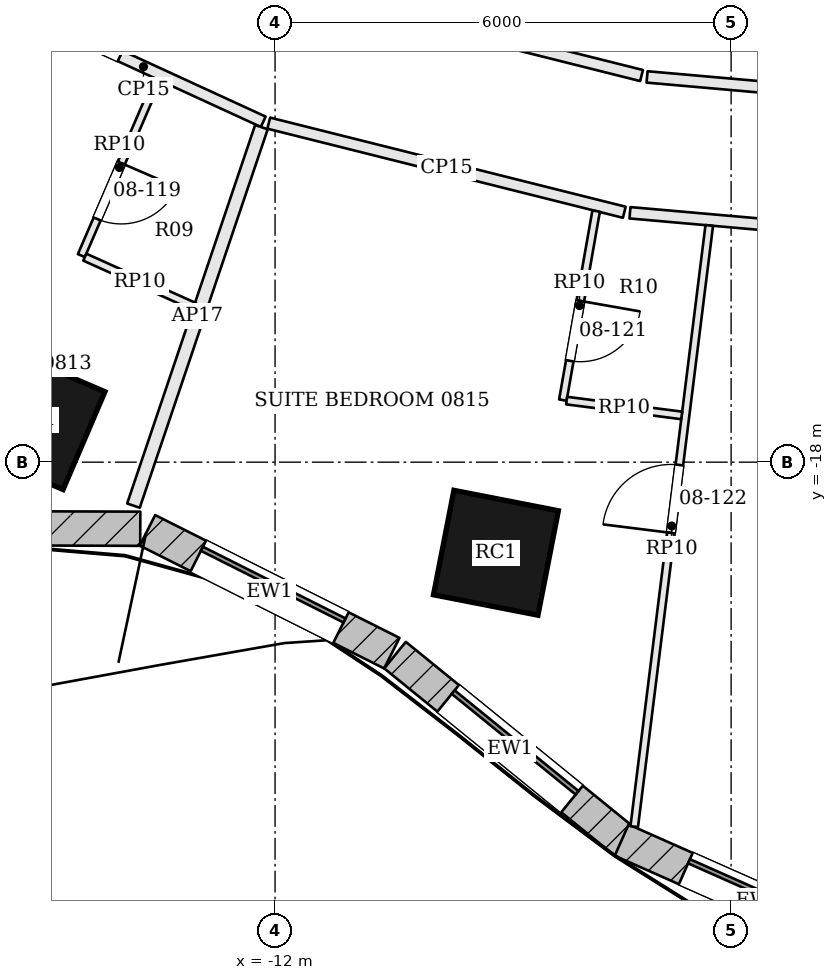
"""IFC4 building model, lengths in metres.
Left out: names, types, materials, properties, quantities, classifications, styles, units other than length and angle.
Written with IfcOpenShell. Run it as: python <this file> out.ifc"""

import sys

from ifc_helpers import new_model, si_unit, direction, frame, frame_2d, origin, origin_2d, place, context, subcontext, project, spatial, rectangle, extrude, element, fill, save


model = new_model("IFC4")
c1 = context("Model", 3, precision=1e-05, world=origin(), true_north=direction((0.0, 1.0)))
c2 = subcontext(c1, "Body", "Model", "MODEL_VIEW")
j1 = project(units=[si_unit("LENGTHUNIT", "METRE"), si_unit("PLANEANGLEUNIT", "RADIAN")], contexts=[c1])
p1 = place(None, origin())
s1 = spatial("IfcSite", under=j1, at=p1, CompositionType="ELEMENT")
p2 = place(p1, origin())
s2 = spatial("IfcBuilding", under=s1, at=p2, CompositionType="ELEMENT")
p3 = place(p2, frame((0.0, 0.0, 44.7)))
s3 = spatial("IfcBuildingStorey", under=s2, at=p3, CompositionType="ELEMENT", Elevation=44.7)
for number, where, z_axis, x_axis in (
    (1, (-15.157, -17.441, 0.0), (0.0, 0.0, 1.0), (0.919, -0.394, 0.0)),
    (2, (-9.094, -19.192, 0.0), (0.0, 0.0, 1.0), (0.981, -0.192, 0.0)),
):
    element("IfcColumn", number, at=place(p3, frame(where, z_axis=z_axis, x_axis=x_axis)), inside=s3, PredefinedType="COLUMN", context=c2, shape_type="SweptSolid", body=[
        extrude(rectangle(XDim=1.4, YDim=1.4, at=origin_2d()), origin(), (0.0, 0.0, 1.0), 3.6),
    ])
p4 = place(p3, frame((-19.65, -18.857, 0.0), z_axis=(0.0, 0.0, 1.0), x_axis=(0.999994750773, -0.003240127552, 0.0)))
e3 = element("IfcWall", 3, at=p4, inside=s3, PredefinedType="SOLIDWALL", context=c2, shape_type="SweptSolid", body=[
    extrude(rectangle(XDim=5.877, YDim=0.45, at=frame_2d((2.938, 0.0))), origin(), (0.0, 0.0, 1.0), 3.4),
])
p5 = place(p4, frame((1.889, 0.0, 0.9)))
e4 = element("IfcOpeningElement", 4, at=p5, cuts=e3, PredefinedType="OPENING", context=c2, shape_type="SweptSolid", body=[
    extrude(rectangle(XDim=2.1, YDim=2.0, at=frame_2d((1.05, 1.0))), frame((0.0, 0.235, 0.0), z_axis=(0.0, -1.0, 0.0), x_axis=(1.0, 0.0, 0.0)), (0.0, 0.0, 1.0), 0.47),
])
p6 = place(p3, frame((-13.679, -18.897, 0.0), z_axis=(0.0, 0.0, 1.0), x_axis=(0.893502471356, -0.449058274259, 0.0)))
e5 = element("IfcWall", 5, at=p6, inside=s3, PredefinedType="SOLIDWALL", context=c2, shape_type="SweptSolid", body=[
    extrude(rectangle(XDim=3.598, YDim=0.45, at=frame_2d((1.799, 0.0))), origin(), (0.0, 0.0, 1.0), 3.4),
])
p7 = place(p6, frame((0.749, 0.0, 0.9)))
e6 = element("IfcOpeningElement", 6, at=p7, cuts=e5, PredefinedType="OPENING", context=c2, shape_type="SweptSolid", body=[
    extrude(rectangle(XDim=2.1, YDim=2.0, at=frame_2d((1.05, 1.0))), frame((0.0, 0.235, 0.0), z_axis=(0.0, -1.0, 0.0), x_axis=(1.0, 0.0, 0.0)), (0.0, 0.0, 1.0), 0.47),
])
p8 = place(p3, frame((-10.422, -20.539, 0.0), z_axis=(0.0, 0.0, 1.0), x_axis=(0.775999170522, -0.63073392754, 0.0)))
e7 = element("IfcWall", 7, at=p8, inside=s3, PredefinedType="SOLIDWALL", context=c2, shape_type="SweptSolid", body=[
    extrude(rectangle(XDim=3.903, YDim=0.45, at=frame_2d((1.951, 0.0))), origin(), (0.0, 0.0, 1.0), 3.4),
])
p9 = place(p8, frame((0.901, 0.0, 0.9)))
e8 = element("IfcOpeningElement", 8, at=p9, cuts=e7, PredefinedType="OPENING", context=c2, shape_type="SweptSolid", body=[
    extrude(rectangle(XDim=2.1, YDim=2.0, at=frame_2d((1.05, 1.0))), frame((0.0, 0.235, 0.0), z_axis=(0.0, -1.0, 0.0), x_axis=(1.0, 0.0, 0.0)), (0.0, 0.0, 1.0), 0.47),
])
p10 = place(p3, frame((-7.44, -22.972, 0.0), z_axis=(0.0, 0.0, 1.0), x_axis=(0.914114918534, -0.405455195692, 0.0)))
e9 = element("IfcWall", 9, at=p10, inside=s3, PredefinedType="SOLIDWALL", context=c2, shape_type="SweptSolid", body=[
    extrude(rectangle(XDim=3.946, YDim=0.45, at=frame_2d((1.973, 0.0))), origin(), (0.0, 0.0, 1.0), 3.4),
])
p11 = place(p10, frame((0.923, 0.0, 0.9)))
e10 = element("IfcOpeningElement", 10, at=p11, cuts=e9, PredefinedType="OPENING", context=c2, shape_type="SweptSolid", body=[
    extrude(rectangle(XDim=2.1, YDim=2.0, at=frame_2d((1.05, 1.0))), frame((0.0, 0.235, 0.0), z_axis=(0.0, -1.0, 0.0), x_axis=(1.0, 0.0, 0.0)), (0.0, 0.0, 1.0), 0.47),
])
p12 = place(p3, frame((-15.306, -12.073, 0.0), z_axis=(0.0, 0.0, 1.0), x_axis=(0.908590925734, -0.417687119354, 0.0)))
e11 = element("IfcWall", 11, at=p12, inside=s3, PredefinedType="PARTITIONING", context=c2, shape_type="SweptSolid", body=[
    extrude(rectangle(XDim=3.468, YDim=0.15, at=frame_2d((1.734, 0.0))), origin(), (0.0, 0.0, 1.0), 2.68),
])
p13 = place(p12, frame((0.496, 0.0, 0.0)))
e12 = element("IfcOpeningElement", 12, at=p13, cuts=e11, PredefinedType="OPENING", context=c2, shape_type="SweptSolid", body=[
    extrude(rectangle(XDim=0.9, YDim=2.4, at=frame_2d((0.45, 1.2))), frame((0.0, 0.085, 0.0), z_axis=(0.0, -1.0, 0.0), x_axis=(1.0, 0.0, 0.0)), (0.0, 0.0, 1.0), 0.17),
])
p14 = place(p3, frame((-13.863, -18.572, 0.0), z_axis=(0.0, 0.0, 1.0), x_axis=(0.32028005449, 0.947322905189, 0.0)))
e13 = element("IfcWall", 13, at=p14, inside=s3, PredefinedType="PARTITIONING", context=c2, shape_type="SweptSolid", body=[
    extrude(rectangle(XDim=5.256, YDim=0.175, at=frame_2d((2.628, 0.0))), origin(), (0.0, 0.0, 1.0), 2.68),
])
p15 = place(p3, frame((-12.083, -13.54, 0.0), z_axis=(0.0, 0.0, 1.0), x_axis=(0.969981460173, -0.243178878443, 0.0)))
e14 = element("IfcWall", 14, at=p15, inside=s3, PredefinedType="PARTITIONING", context=c2, shape_type="SweptSolid", body=[
    extrude(rectangle(XDim=4.822, YDim=0.15, at=frame_2d((2.411, 0.0))), origin(), (0.0, 0.0, 1.0), 2.68),
])
p16 = place(p3, frame((-7.331, -14.719, 0.0), z_axis=(0.0, 0.0, 1.0), x_axis=(0.996139466017, -0.087784760882, 0.0)))
e15 = element("IfcWall", 15, at=p16, inside=s3, PredefinedType="PARTITIONING", context=c2, shape_type="SweptSolid", body=[
    extrude(rectangle(XDim=5.162, YDim=0.15, at=frame_2d((2.581, 0.0))), origin(), (0.0, 0.0, 1.0), 2.68),
])
p17 = place(p16, frame((3.622, 0.0, 0.0)))
e16 = element("IfcOpeningElement", 16, at=p17, cuts=e15, PredefinedType="OPENING", context=c2, shape_type="SweptSolid", body=[
    extrude(rectangle(XDim=1.0, YDim=2.1, at=frame_2d((0.5, 1.05))), frame((0.0, 0.085, 0.0), z_axis=(0.0, -1.0, 0.0), x_axis=(1.0, 0.0, 0.0)), (0.0, 0.0, 1.0), 0.17),
])
p18 = place(p3, frame((-2.208, -13.364, 0.0), z_axis=(0.0, 0.0, 1.0), x_axis=(-0.996134962793, 0.087835846335, 0.0)))
e17 = element("IfcWall", 17, at=p18, inside=s3, PredefinedType="PARTITIONING", context=c2, shape_type="SweptSolid", body=[
    extrude(rectangle(XDim=4.917, YDim=0.15, at=frame_2d((2.458, 0.0))), origin(), (0.0, 0.0, 1.0), 2.68),
])
p19 = place(p3, frame((-7.178, -12.914, 0.0), z_axis=(0.0, 0.0, 1.0), x_axis=(-0.969983523639, 0.243170647628, 0.0)))
e18 = element("IfcWall", 18, at=p19, inside=s3, PredefinedType="PARTITIONING", context=c2, shape_type="SweptSolid", body=[
    extrude(rectangle(XDim=4.794, YDim=0.15, at=frame_2d((2.397, 0.0))), origin(), (0.0, 0.0, 1.0), 2.68),
])
p20 = place(p3, frame((-13.548, -12.964, 0.0), z_axis=(0.0, 0.0, 1.0), x_axis=(-0.396147057277, -0.918187077349, 0.0)))
e19 = element("IfcWall", 19, at=p20, inside=s3, PredefinedType="PARTITIONING", context=c2, shape_type="SweptSolid", body=[
    extrude(rectangle(XDim=2.525, YDim=0.1, at=frame_2d((1.262, 0.0))), origin(), (0.0, 0.0, 1.0), 2.68),
])
p21 = place(p20, frame((1.2, 0.0, 0.0)))
e20 = element("IfcOpeningElement", 20, at=p21, cuts=e19, PredefinedType="OPENING", context=c2, shape_type="SweptSolid", body=[
    extrude(rectangle(XDim=0.8, YDim=2.1, at=frame_2d((0.4, 1.05))), frame((0.0, 0.06, 0.0), z_axis=(0.0, -1.0, 0.0), x_axis=(1.0, 0.0, 0.0)), (0.0, 0.0, 1.0), 0.12),
])
p22 = place(p3, frame((-14.503, -15.303, 0.0), z_axis=(0.0, 0.0, 1.0), x_axis=(0.911884052512, -0.410447895323, 0.0)))
e21 = element("IfcWall", 21, at=p22, inside=s3, PredefinedType="PARTITIONING", context=c2, shape_type="SweptSolid", body=[
    extrude(rectangle(XDim=1.586, YDim=0.1, at=frame_2d((0.793, 0.0))), origin(), (0.0, 0.0, 1.0), 2.68),
])
p23 = place(p3, frame((-7.275, -22.795, 0.0), z_axis=(0.0, 0.0, 1.0), x_axis=(0.123872623133, 0.992298127197, 0.0)))
e22 = element("IfcWall", 22, at=p23, inside=s3, PredefinedType="PARTITIONING", context=c2, shape_type="SweptSolid", body=[
    extrude(rectangle(XDim=7.97, YDim=0.1, at=frame_2d((3.985, 0.0))), origin(), (0.0, 0.0, 1.0), 2.68),
])
p24 = place(p23, frame((3.895, 0.0, 0.0)))
e23 = element("IfcOpeningElement", 23, at=p24, cuts=e22, PredefinedType="OPENING", context=c2, shape_type="SweptSolid", body=[
    extrude(rectangle(XDim=0.9, YDim=2.4, at=frame_2d((0.45, 1.2))), frame((0.0, 0.06, 0.0), z_axis=(0.0, -1.0, 0.0), x_axis=(1.0, 0.0, 0.0)), (0.0, 0.0, 1.0), 0.12),
])
p25 = place(p3, frame((-7.776, -14.697, 0.0), z_axis=(0.0, 0.0, 1.0), x_axis=(-0.173360606745, -0.984858416235, 0.0)))
e24 = element("IfcWall", 24, at=p25, inside=s3, PredefinedType="PARTITIONING", context=c2, shape_type="SweptSolid", body=[
    extrude(rectangle(XDim=2.525, YDim=0.1, at=frame_2d((1.263, 0.0))), origin(), (0.0, 0.0, 1.0), 2.68),
])
p26 = place(p25, frame((1.2, 0.0, 0.0)))
e25 = element("IfcOpeningElement", 25, at=p26, cuts=e24, PredefinedType="OPENING", context=c2, shape_type="SweptSolid", body=[
    extrude(rectangle(XDim=0.8, YDim=2.1, at=frame_2d((0.4, 1.05))), frame((0.0, 0.06, 0.0), z_axis=(0.0, -1.0, 0.0), x_axis=(1.0, 0.0, 0.0)), (0.0, 0.0, 1.0), 0.12),
])
p27 = place(p3, frame((-8.164, -17.19, 0.0), z_axis=(0.0, 0.0, 1.0), x_axis=(0.991762801698, -0.128088036788, 0.0)))
e26 = element("IfcWall", 26, at=p27, inside=s3, PredefinedType="PARTITIONING", context=c2, shape_type="SweptSolid", body=[
    extrude(rectangle(XDim=1.527, YDim=0.1, at=frame_2d((0.763, 0.0))), origin(), (0.0, 0.0, 1.0), 2.68),
])
p28 = place(p7, origin())
e27 = element("IfcWindow", 27, at=p28, inside=s3, PartitioningType="SINGLE_PANEL", PredefinedType="WINDOW", context=c2, shape_type="SweptSolid", body=[
    extrude(rectangle(XDim=2.1, YDim=2.0, at=frame_2d((1.05, 1.0))), frame((0.0, 0.135, 0.0), z_axis=(0.0, -1.0, 0.0), x_axis=(1.0, 0.0, 0.0)), (0.0, 0.0, 1.0), 0.06),
])
fill(e6, e27)
p29 = place(p9, origin())
e28 = element("IfcWindow", 28, at=p29, inside=s3, PartitioningType="SINGLE_PANEL", PredefinedType="WINDOW", context=c2, shape_type="SweptSolid", body=[
    extrude(rectangle(XDim=2.1, YDim=2.0, at=frame_2d((1.05, 1.0))), frame((0.0, 0.135, 0.0), z_axis=(0.0, -1.0, 0.0), x_axis=(1.0, 0.0, 0.0)), (0.0, 0.0, 1.0), 0.06),
])
fill(e8, e28)
p30 = place(p11, origin())
e29 = element("IfcWindow", 29, at=p30, inside=s3, PartitioningType="SINGLE_PANEL", PredefinedType="WINDOW", context=c2, shape_type="SweptSolid", body=[
    extrude(rectangle(XDim=2.1, YDim=2.0, at=frame_2d((1.05, 1.0))), frame((0.0, 0.135, 0.0), z_axis=(0.0, -1.0, 0.0), x_axis=(1.0, 0.0, 0.0)), (0.0, 0.0, 1.0), 0.06),
])
fill(e10, e29)
p31 = place(p21, origin())
e30 = element("IfcDoor", 30, at=p31, inside=s3, OperationType="SINGLE_SWING_LEFT", PredefinedType="DOOR", context=c2, shape_type="SweptSolid", body=[
    extrude(rectangle(XDim=0.8, YDim=2.1, at=frame_2d((0.4, 1.05))), frame((0.0, 0.025, 0.0), z_axis=(0.0, -1.0, 0.0), x_axis=(1.0, 0.0, 0.0)), (0.0, 0.0, 1.0), 0.05),
])
fill(e20, e30)
p32 = place(p13, origin())
e31 = element("IfcDoor", 31, at=p32, inside=s3, OperationType="SINGLE_SWING_RIGHT", PredefinedType="DOOR", context=c2, shape_type="SweptSolid", body=[
    extrude(rectangle(XDim=0.9, YDim=2.4, at=frame_2d((0.45, 1.2))), frame((0.0, 0.025, 0.0), z_axis=(0.0, -1.0, 0.0), x_axis=(1.0, 0.0, 0.0)), (0.0, 0.0, 1.0), 0.05),
])
fill(e12, e31)
p33 = place(p26, origin())
e32 = element("IfcDoor", 32, at=p33, inside=s3, OperationType="SINGLE_SWING_LEFT", PredefinedType="DOOR", context=c2, shape_type="SweptSolid", body=[
    extrude(rectangle(XDim=0.8, YDim=2.1, at=frame_2d((0.4, 1.05))), frame((0.0, 0.025, 0.0), z_axis=(0.0, -1.0, 0.0), x_axis=(1.0, 0.0, 0.0)), (0.0, 0.0, 1.0), 0.05),
])
fill(e25, e32)
p34 = place(p24, origin())
e33 = element("IfcDoor", 33, at=p34, inside=s3, OperationType="SINGLE_SWING_LEFT", PredefinedType="DOOR", context=c2, shape_type="SweptSolid", body=[
    extrude(rectangle(XDim=0.9, YDim=2.4, at=frame_2d((0.45, 1.2))), frame((0.0, 0.025, 0.0), z_axis=(0.0, -1.0, 0.0), x_axis=(1.0, 0.0, 0.0)), (0.0, 0.0, 1.0), 0.05),
])
fill(e23, e33)
save(model, sys.argv[1])
